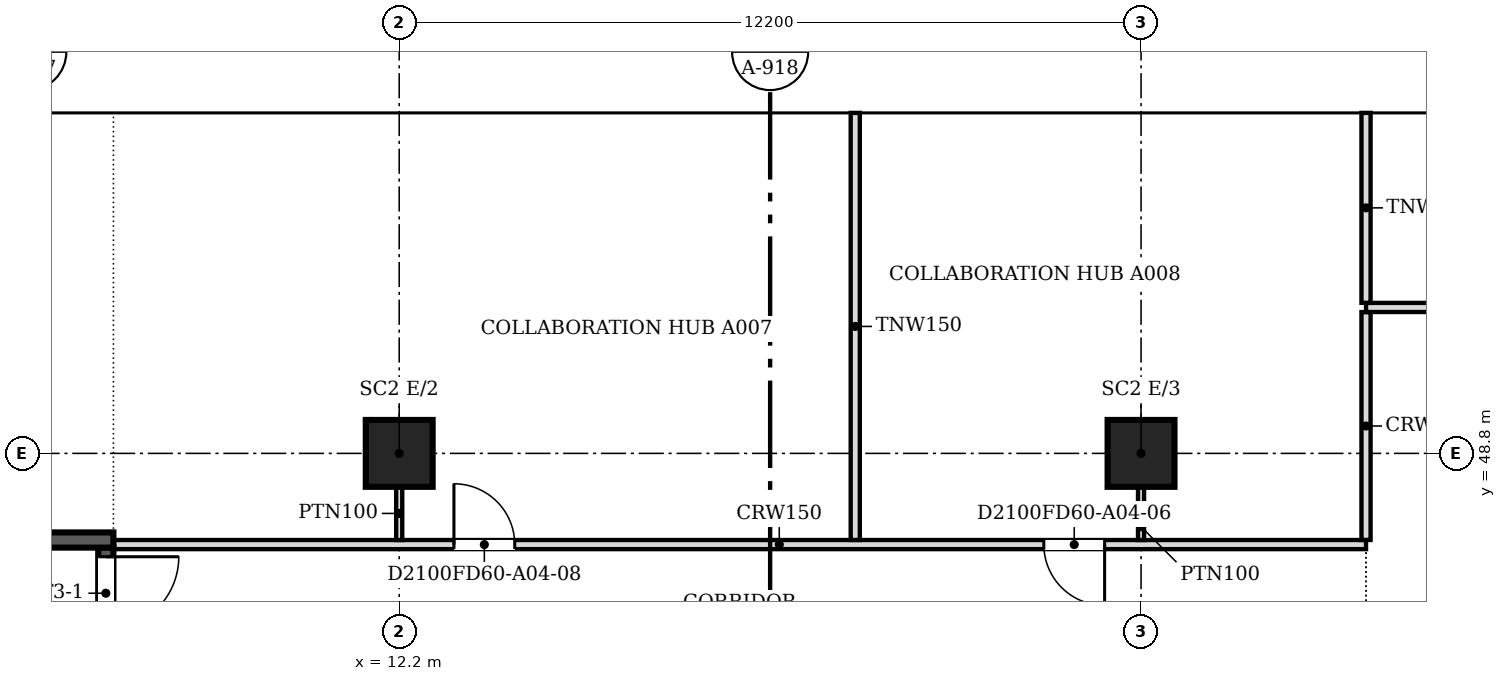
"""IFC4 building model, lengths in metres.
Left out: names, types, materials, properties, quantities, classifications, styles, units other than length and angle.
Written with IfcOpenShell. Run it as: python <this file> out.ifc"""

import sys

from ifc_helpers import new_model, si_unit, direction, frame, frame_2d, origin, origin_2d, place, context, subcontext, project, spatial, polyline, rectangle, outline, extrude, faceted_brep, source, transform, mapped, element, fill, save


model = new_model("IFC4")
c1 = context("Model", 3, precision=1e-05, world=origin(), true_north=direction((0.0, 1.0)))
c2 = subcontext(c1, "Body", "Model", "MODEL_VIEW")
j1 = project(units=[si_unit("LENGTHUNIT", "METRE"), si_unit("PLANEANGLEUNIT", "RADIAN")], contexts=[c1])
p1 = place(None, origin())
s1 = spatial("IfcSite", under=j1, at=p1, CompositionType="ELEMENT")
p2 = place(p1, origin())
s2 = spatial("IfcBuilding", under=s1, at=p2, CompositionType="ELEMENT")
p3 = place(p2, frame((0.0, 0.0, 48.6)))
s3 = spatial("IfcBuildingStorey", under=s2, at=p3, CompositionType="ELEMENT", Elevation=48.6)
for number, where, z_axis, x_axis in (
    (1, (12.2, 48.8, 0.0), (0.0, 0.0, 1.0), (1.0, 0.0, 0.0)),
    (2, (24.4, 48.8, 0.0), (0.0, 0.0, 1.0), (1.0, 0.0, 0.0)),
):
    element("IfcColumn", number, at=place(p3, frame(where, z_axis=z_axis, x_axis=x_axis)), inside=s3, PredefinedType="COLUMN", context=c2, shape_type="SweptSolid", body=[
        extrude(rectangle(XDim=1.1, YDim=1.1, at=origin_2d()), origin(), (0.0, 0.0, 1.0), 3.6),
    ])
m1 = source(origin(), c2, "Body", "SweptSolid", [
    extrude(outline(polyline([(3.05, 0.0), (6.1, 3.8), (3.05, 7.6), (0.0, 3.8), (3.05, 0.0)])), frame((0.0, 0.25, 0.0), z_axis=(0.0, -1.0, 0.0), x_axis=(1.0, 0.0, 0.0)), (0.0, 0.0, 1.0), 0.5),
])
p4 = place(p3, frame((33.55, 54.65, -3.8), z_axis=(0.0, 0.0, 1.0), x_axis=(-1.0, 0.0, 0.0)))
e3 = element("IfcWall", 3, at=p4, inside=s3, PredefinedType="SOLIDWALL", context=c2, shape_type="MappedRepresentation", body=[
    mapped(m1, transform((0.0, 0.0, 0.0), scale=1.0)),
])
m2 = source(origin(), c2, "Body", "SweptSolid", [
    extrude(outline(polyline([(3.05, 0.399), (5.78, 3.8), (3.05, 7.2), (0.321, 3.8), (3.05, 0.399)])), frame((0.0, 0.26, 0.0), z_axis=(0.0, -1.0, 0.0), x_axis=(1.0, 0.0, 0.0)), (0.0, 0.0, 1.0), 0.52),
])
p5 = place(p4, origin())
e4 = element("IfcOpeningElement", 4, at=p5, cuts=e3, PredefinedType="OPENING", context=c2, shape_type="MappedRepresentation", body=[
    mapped(m2, transform((0.0, 0.0, 0.0), scale=1.0)),
])
m3 = source(origin(), c2, "Body", "Brep", [
    faceted_brep([(3.05, -0.25, 0.0), (6.1, -0.25, 3.8), (6.1, -0.25, 3.8), (3.05, -0.25, 7.6), (0.0, -0.25, 3.8), (0.0, 0.25, 3.8), (3.05, 0.25, 7.6), (6.1, 0.25, 3.8), (6.1, 0.25, 3.8), (3.05, 0.25, 0.0)], [[[0, 1, 2, 3, 4]], [[5, 6, 7, 8, 9]], [[9, 8, 1, 0]], [[7, 6, 3, 2]], [[6, 5, 4, 3]], [[5, 9, 0, 4]], [[1, 8, 7, 2]]]),
])
p6 = place(p3, frame((27.45, 54.65, -3.8), z_axis=(0.0, 0.0, 1.0), x_axis=(-1.0, 0.0, 0.0)))
e5 = element("IfcWall", 5, at=p6, inside=s3, PredefinedType="SOLIDWALL", context=c2, shape_type="MappedRepresentation", body=[
    mapped(m3, transform((0.0, 0.0, 0.0), scale=1.0)),
])
p7 = place(p6, origin())
e6 = element("IfcOpeningElement", 6, at=p7, cuts=e5, PredefinedType="OPENING", context=c2, shape_type="MappedRepresentation", body=[
    mapped(m2, transform((0.0, 0.0, 0.0), scale=1.0)),
])
p8 = place(p3, frame((21.35, 54.65, -3.8), z_axis=(0.0, 0.0, 1.0), x_axis=(-1.0, 0.0, 0.0)))
e7 = element("IfcWall", 7, at=p8, inside=s3, PredefinedType="SOLIDWALL", context=c2, shape_type="MappedRepresentation", body=[
    mapped(m1, transform((0.0, 0.0, 0.0), scale=1.0)),
])
p9 = place(p8, origin())
e8 = element("IfcOpeningElement", 8, at=p9, cuts=e7, PredefinedType="OPENING", context=c2, shape_type="MappedRepresentation", body=[
    mapped(m2, transform((0.0, 0.0, 0.0), scale=1.0)),
])
p10 = place(p3, frame((15.25, 54.65, -3.8), z_axis=(0.0, 0.0, 1.0), x_axis=(-1.0, 0.0, 0.0)))
e9 = element("IfcWall", 9, at=p10, inside=s3, PredefinedType="SOLIDWALL", context=c2, shape_type="MappedRepresentation", body=[
    mapped(m1, transform((0.0, 0.0, 0.0), scale=1.0)),
])
p11 = place(p10, origin())
e10 = element("IfcOpeningElement", 10, at=p11, cuts=e9, PredefinedType="OPENING", context=c2, shape_type="MappedRepresentation", body=[
    mapped(m2, transform((0.0, 0.0, 0.0), scale=1.0)),
])
m4 = source(origin(), c2, "Body", "Brep", [
    faceted_brep([(3.003, -0.25, 0.0), (3.05, -0.25, 0.06), (3.05, -0.25, 7.54), (3.003, -0.25, 7.6), (0.0, -0.25, 3.8), (0.0, 0.25, 3.8), (2.957, 0.25, 7.541), (2.957, 0.25, 0.059), (3.003, 0.0, 0.0), (3.003, 0.0, 7.6)], [[[0, 1, 2, 3, 4]], [[5, 6, 7]], [[1, 0, 8]], [[9, 3, 2]], [[6, 5, 4, 3, 9]], [[5, 7, 8, 0, 4]], [[1, 8, 7, 6, 9, 2]]]),
])
p12 = place(p3, frame((9.15, 54.65, -3.8), z_axis=(0.0, 0.0, 1.0), x_axis=(-1.0, 0.0, 0.0)))
e11 = element("IfcWall", 11, at=p12, inside=s3, PredefinedType="SOLIDWALL", context=c2, shape_type="MappedRepresentation", body=[
    mapped(m4, transform((0.0, 0.0, 0.0), scale=1.0)),
])
m5 = source(origin(), c2, "Body", "SweptSolid", [
    extrude(outline(polyline([(2.803, 6.944), (0.319, 3.8), (2.803, 0.656), (2.803, 6.944)])), frame((0.0, 0.26, 0.0), z_axis=(0.0, -1.0, 0.0), x_axis=(1.0, 0.0, 0.0)), (0.0, 0.0, 1.0), 0.52),
])
p13 = place(p12, origin())
e12 = element("IfcOpeningElement", 12, at=p13, cuts=e11, PredefinedType="OPENING", context=c2, shape_type="MappedRepresentation", body=[
    mapped(m5, transform((0.0, 0.0, 0.0), scale=1.0)),
])
p14 = place(p2, frame((0.0, 0.0, 52.4)))
s4 = spatial("IfcBuildingStorey", under=s2, at=p14, CompositionType="ELEMENT", Elevation=52.4)
m6 = source(origin(), c2, "Body", "SweptSolid", [
    extrude(outline(polyline([(3.05, 0.0), (6.1, 3.8), (3.05, 7.6), (0.0, 3.8), (3.05, 0.0)])), frame((0.0, 0.25, 0.0), z_axis=(0.0, -1.0, 0.0), x_axis=(1.0, 0.0, 0.0)), (0.0, 0.0, 1.0), 0.5),
])
p15 = place(p14, frame((30.5, 54.65, -3.8), z_axis=(0.0, 0.0, 1.0), x_axis=(-1.0, 0.0, 0.0)))
e13 = element("IfcWall", 13, at=p15, inside=s4, PredefinedType="SOLIDWALL", context=c2, shape_type="MappedRepresentation", body=[
    mapped(m6, transform((0.0, 0.0, 0.0), scale=1.0)),
])
m7 = source(origin(), c2, "Body", "SweptSolid", [
    extrude(outline(polyline([(3.05, 0.399), (5.78, 3.8), (3.05, 7.2), (0.321, 3.8), (3.05, 0.399)])), frame((0.0, 0.26, 0.0), z_axis=(0.0, -1.0, 0.0), x_axis=(1.0, 0.0, 0.0)), (0.0, 0.0, 1.0), 0.52),
])
p16 = place(p15, origin())
e14 = element("IfcOpeningElement", 14, at=p16, cuts=e13, PredefinedType="OPENING", context=c2, shape_type="MappedRepresentation", body=[
    mapped(m7, transform((0.0, 0.0, 0.0), scale=1.0)),
])
m8 = source(origin(), c2, "Body", "Brep", [
    faceted_brep([(3.05, -0.25, 0.0), (6.1, -0.25, 3.8), (6.1, -0.25, 3.8), (3.05, -0.25, 7.6), (0.0, -0.25, 3.8), (0.0, 0.25, 3.8), (3.05, 0.25, 7.6), (6.1, 0.25, 3.8), (6.1, 0.25, 3.8), (3.05, 0.25, 0.0)], [[[0, 1, 2, 3, 4]], [[5, 6, 7, 8, 9]], [[9, 8, 1, 0]], [[7, 6, 3, 2]], [[6, 5, 4, 3]], [[5, 9, 0, 4]], [[1, 8, 7, 2]]]),
])
p17 = place(p14, frame((24.4, 54.65, -3.8), z_axis=(0.0, 0.0, 1.0), x_axis=(-1.0, 0.0, 0.0)))
e15 = element("IfcWall", 15, at=p17, inside=s4, PredefinedType="SOLIDWALL", context=c2, shape_type="MappedRepresentation", body=[
    mapped(m8, transform((0.0, 0.0, 0.0), scale=1.0)),
])
p18 = place(p17, origin())
e16 = element("IfcOpeningElement", 16, at=p18, cuts=e15, PredefinedType="OPENING", context=c2, shape_type="MappedRepresentation", body=[
    mapped(m7, transform((0.0, 0.0, 0.0), scale=1.0)),
])
p19 = place(p14, frame((18.3, 54.65, -3.8), z_axis=(0.0, 0.0, 1.0), x_axis=(-1.0, 0.0, 0.0)))
e17 = element("IfcWall", 17, at=p19, inside=s4, PredefinedType="SOLIDWALL", context=c2, shape_type="MappedRepresentation", body=[
    mapped(m6, transform((0.0, 0.0, 0.0), scale=1.0)),
])
p20 = place(p19, origin())
e18 = element("IfcOpeningElement", 18, at=p20, cuts=e17, PredefinedType="OPENING", context=c2, shape_type="MappedRepresentation", body=[
    mapped(m7, transform((0.0, 0.0, 0.0), scale=1.0)),
])
m9 = source(origin(), c2, "Body", "Brep", [
    faceted_brep([(3.05, -0.25, 0.0), (6.053, -0.25, 3.8), (3.05, -0.25, 7.6), (0.0, -0.25, 3.8), (0.0, 0.25, 3.8), (3.05, 0.25, 7.6), (6.007, 0.25, 3.859), (6.007, 0.25, 3.741), (3.05, 0.25, 0.0), (6.053, 0.0, 3.8)], [[[0, 1, 2, 3]], [[4, 5, 6, 7, 8]], [[8, 7, 9, 1, 0]], [[6, 5, 2, 1, 9]], [[5, 4, 3, 2]], [[4, 8, 0, 3]], [[9, 7, 6]]]),
])
p21 = place(p14, frame((12.2, 54.65, -3.8), z_axis=(0.0, 0.0, 1.0), x_axis=(-1.0, 0.0, 0.0)))
e19 = element("IfcWall", 19, at=p21, inside=s4, PredefinedType="SOLIDWALL", context=c2, shape_type="MappedRepresentation", body=[
    mapped(m9, transform((0.0, 0.0, 0.0), scale=1.0)),
])
m10 = source(origin(), c2, "Body", "SweptSolid", [
    extrude(outline(polyline([(3.049, 0.401), (5.735, 3.8), (3.049, 7.199), (0.321, 3.8), (3.049, 0.401)])), frame((0.0, 0.26, 0.0), z_axis=(0.0, -1.0, 0.0), x_axis=(1.0, 0.0, 0.0)), (0.0, 0.0, 1.0), 0.52),
])
p22 = place(p21, origin())
e20 = element("IfcOpeningElement", 20, at=p22, cuts=e19, PredefinedType="OPENING", context=c2, shape_type="MappedRepresentation", body=[
    mapped(m10, transform((0.0, 0.0, 0.0), scale=1.0)),
])
p23 = place(p3, frame((3.6, 47.375, 0.0), z_axis=(0.0, 0.0, 1.0), x_axis=(1.0, 0.0, 0.0)))
e21 = element("IfcWall", 21, at=p23, inside=s3, PredefinedType="SOLIDWALL", context=c2, shape_type="SweptSolid", body=[
    extrude(rectangle(XDim=3.9, YDim=0.25, at=frame_2d((1.95, 0.0))), origin(), (0.0, 0.0, 1.0), 3.8),
])
p24 = place(p3, frame((7.375, 47.25, 0.0), z_axis=(0.0, 0.0, 1.0), x_axis=(0.0, -1.0, 0.0)))
e22 = element("IfcWall", 22, at=p24, inside=s3, PredefinedType="SOLIDWALL", context=c2, shape_type="SweptSolid", body=[
    extrude(rectangle(XDim=8.0, YDim=0.25, at=frame_2d((4.0, 0.0))), origin(), (0.0, 0.0, 1.0), 3.8),
])
m11 = source(origin(), c2, "Body", "SweptSolid", [
    extrude(rectangle(XDim=1.2, YDim=2.1, at=frame_2d((0.6, 1.05))), frame((0.0, 0.135, 0.0), z_axis=(0.0, -1.0, 0.0), x_axis=(1.0, 0.0, 0.0)), (0.0, 0.0, 1.0), 0.27),
])
p25 = place(p24, frame((0.15, 0.0, 0.0)))
e23 = element("IfcOpeningElement", 23, at=p25, cuts=e22, PredefinedType="OPENING", context=c2, shape_type="MappedRepresentation", body=[
    mapped(m11, transform((0.0, 0.0, 0.0), scale=1.0)),
])
p26 = place(p3, frame((7.5, 47.3, 0.0), z_axis=(0.0, 0.0, 1.0), x_axis=(1.0, 0.0, 0.0)))
e24 = element("IfcWall", 24, at=p26, inside=s3, PredefinedType="PARTITIONING", context=c2, shape_type="SweptSolid", body=[
    extrude(rectangle(XDim=20.6, YDim=0.15, at=frame_2d((10.3, 0.0))), origin(), (0.0, 0.0, 1.0), 3.067),
])
m12 = source(origin(), c2, "Body", "SweptSolid", [
    extrude(rectangle(XDim=1.0, YDim=2.1, at=frame_2d((0.5, 1.05))), frame((0.0, 0.085, 0.0), z_axis=(0.0, -1.0, 0.0), x_axis=(1.0, 0.0, 0.0)), (0.0, 0.0, 1.0), 0.17),
])
p27 = place(p26, frame((15.301, 0.0, 0.0)))
e25 = element("IfcOpeningElement", 25, at=p27, cuts=e24, PredefinedType="OPENING", context=c2, shape_type="MappedRepresentation", body=[
    mapped(m12, transform((0.0, 0.0, 0.0), scale=1.0)),
])
p28 = place(p26, frame((5.6, 0.0, 0.0)))
e26 = element("IfcOpeningElement", 26, at=p28, cuts=e24, PredefinedType="OPENING", context=c2, shape_type="MappedRepresentation", body=[
    mapped(m12, transform((0.0, 0.0, 0.0), scale=1.0)),
])
p29 = place(p3, frame((19.7, 47.376, 0.0), z_axis=(0.0, 0.0, 1.0), x_axis=(0.0, 1.0, 0.0)))
e27 = element("IfcWall", 27, at=p29, inside=s3, PredefinedType="PARTITIONING", context=c2, shape_type="SweptSolid", body=[
    extrude(rectangle(XDim=7.024, YDim=0.15, at=frame_2d((3.512, 0.0))), origin(), (0.0, 0.0, 1.0), 3.067),
])
p30 = place(p3, frame((28.1, 47.376, 0.0), z_axis=(0.0, 0.0, 1.0), x_axis=(0.0, 1.0, 0.0)))
e28 = element("IfcWall", 28, at=p30, inside=s3, PredefinedType="PARTITIONING", context=c2, shape_type="SweptSolid", body=[
    extrude(rectangle(XDim=3.748, YDim=0.15, at=frame_2d((1.874, 0.0))), origin(), (0.0, 0.0, 1.0), 3.067),
])
for number, where, z_axis, x_axis in (
    (29, (12.2, 48.25, 0.0), (0.0, 0.0, 1.0), (0.0, -1.0, 0.0)),
    (30, (24.4, 48.25, 0.0), (0.0, 0.0, 1.0), (0.0, -1.0, 0.0)),
):
    element("IfcWall", number, at=place(p3, frame(where, z_axis=z_axis, x_axis=x_axis)), inside=s3, PredefinedType="PARTITIONING", context=c2, shape_type="SweptSolid", body=[
        extrude(rectangle(XDim=0.875, YDim=0.1, at=frame_2d((0.438, 0.0))), origin(), (0.0, 0.0, 1.0), 3.067),
    ])
p31 = place(p3, frame((28.1, 51.2, 0.0), z_axis=(0.0, 0.0, 1.0), x_axis=(1.0, 0.0, 0.0)))
e31 = element("IfcWall", 31, at=p31, inside=s3, PredefinedType="PARTITIONING", context=c2, shape_type="SweptSolid", body=[
    extrude(rectangle(XDim=31.438, YDim=0.15, at=frame_2d((15.719, 0.0))), origin(), (0.0, 0.0, 1.0), 3.067),
])
m13 = source(origin(), c2, "Body", "SweptSolid", [
    extrude(rectangle(XDim=0.9, YDim=2.1, at=frame_2d((0.45, 1.05))), frame((0.0, 0.085, 0.0), z_axis=(0.0, -1.0, 0.0), x_axis=(1.0, 0.0, 0.0)), (0.0, 0.0, 1.0), 0.17),
])
p32 = place(p31, frame((4.1, 0.0, 0.0)))
e32 = element("IfcOpeningElement", 32, at=p32, cuts=e31, PredefinedType="OPENING", context=c2, shape_type="MappedRepresentation", body=[
    mapped(m13, transform((0.0, 0.0, 0.0), scale=1.0)),
])
p33 = place(p31, frame((25.951, 0.0, 0.0)))
e33 = element("IfcOpeningElement", 33, at=p33, cuts=e31, PredefinedType="OPENING", context=c2, shape_type="MappedRepresentation", body=[
    mapped(m13, transform((0.0, 0.0, 0.0), scale=1.0)),
])
p34 = place(p31, frame((14.75, 0.0, 0.0)))
e34 = element("IfcOpeningElement", 34, at=p34, cuts=e31, PredefinedType="OPENING", context=c2, shape_type="MappedRepresentation", body=[
    mapped(m13, transform((0.0, 0.0, 0.0), scale=1.0)),
])
p35 = place(p3, frame((28.1, 51.276, 0.0), z_axis=(0.0, 0.0, 1.0), x_axis=(0.0, 1.0, 0.0)))
e35 = element("IfcWall", 35, at=p35, inside=s3, PredefinedType="PARTITIONING", context=c2, shape_type="SweptSolid", body=[
    extrude(rectangle(XDim=3.124, YDim=0.15, at=frame_2d((1.562, 0.0))), origin(), (0.0, 0.0, 1.0), 3.067),
])
m14 = source(origin(), c2, "Body", "SweptSolid", [
    extrude(rectangle(XDim=1.2, YDim=2.1, at=frame_2d((0.6, 1.05))), frame((0.0, 0.025, 0.0), z_axis=(0.0, -1.0, 0.0), x_axis=(1.0, 0.0, 0.0)), (0.0, 0.0, 1.0), 0.05),
])
p36 = place(p25, origin())
e36 = element("IfcDoor", 36, at=p36, inside=s3, OperationType="SINGLE_SWING_LEFT", PredefinedType="DOOR", context=c2, shape_type="MappedRepresentation", body=[
    mapped(m14, transform((0.0, 0.0, 0.0), scale=1.0)),
])
fill(e23, e36)
m15 = source(origin(), c2, "Body", "SweptSolid", [
    extrude(rectangle(XDim=1.0, YDim=2.1, at=frame_2d((0.5, 1.05))), frame((0.0, 0.025, 0.0), z_axis=(0.0, -1.0, 0.0), x_axis=(1.0, 0.0, 0.0)), (0.0, 0.0, 1.0), 0.05),
])
p37 = place(p27, origin())
e37 = element("IfcDoor", 37, at=p37, inside=s3, OperationType="SINGLE_SWING_RIGHT", PredefinedType="DOOR", context=c2, shape_type="MappedRepresentation", body=[
    mapped(m15, transform((0.0, 0.0, 0.0), scale=1.0)),
])
fill(e25, e37)
p38 = place(p28, origin())
e38 = element("IfcDoor", 38, at=p38, inside=s3, OperationType="SINGLE_SWING_LEFT", PredefinedType="DOOR", context=c2, shape_type="MappedRepresentation", body=[
    mapped(m15, transform((0.0, 0.0, 0.0), scale=1.0)),
])
fill(e26, e38)
save(model, sys.argv[1])
